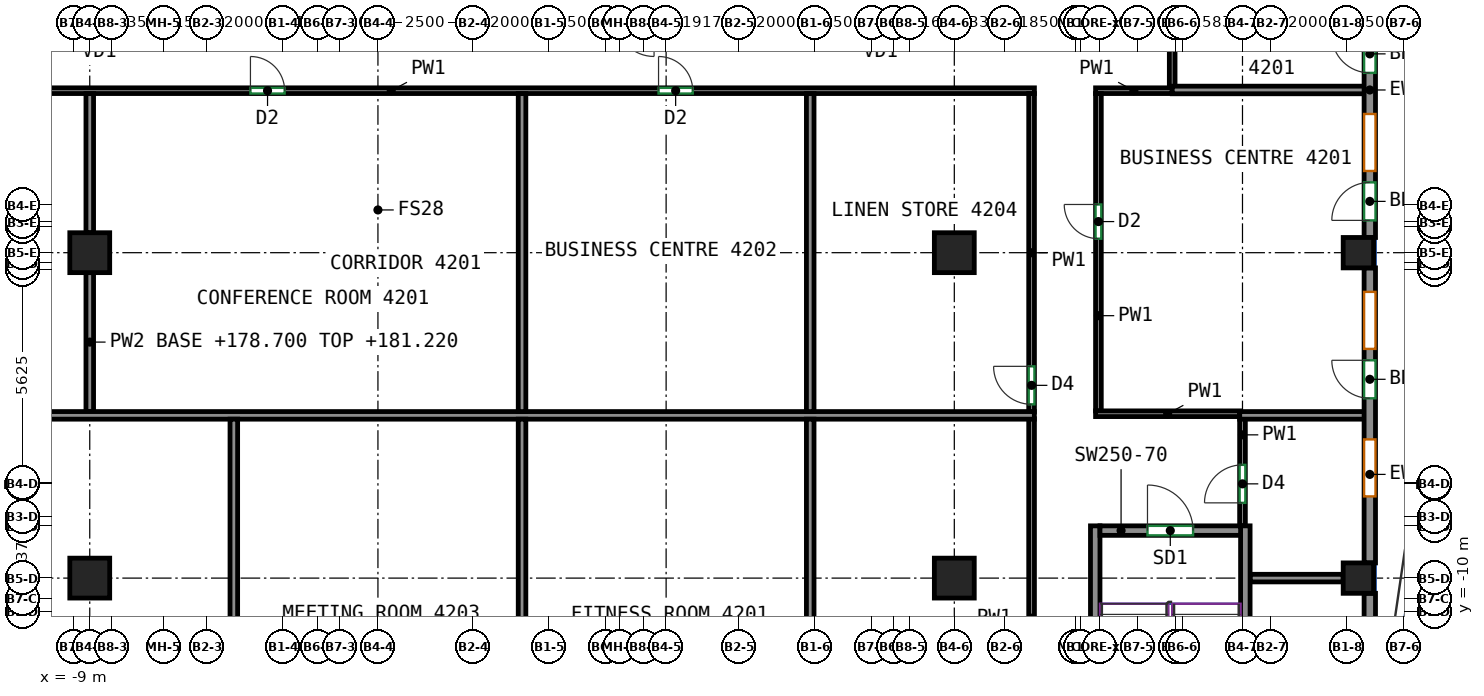
"""IFC4 building model, lengths in metres.
Left out: names, types, materials, properties, quantities, classifications, styles, units other than length and angle.
Written with IfcOpenShell. Run it as: python <this file> out.ifc"""

import sys

from ifc_helpers import new_model, si_unit, direction, frame, frame_2d, origin, origin_2d, place, context, subcontext, project, spatial, rectangle, extrude, source, transform, mapped, element, fill, save


model = new_model("IFC4")
c1 = context("Model", 3, precision=1e-05, world=origin(), true_north=direction((0.0, 1.0)))
c2 = subcontext(c1, "Body", "Model", "MODEL_VIEW")
j1 = project(units=[si_unit("LENGTHUNIT", "METRE"), si_unit("PLANEANGLEUNIT", "RADIAN")], contexts=[c1])
p1 = place(None, origin())
s1 = spatial("IfcSite", under=j1, at=p1, CompositionType="ELEMENT")
p2 = place(p1, origin())
s2 = spatial("IfcBuilding", under=s1, at=p2, CompositionType="ELEMENT")
p3 = place(p2, frame((0.0, 0.0, 178.7)))
s3 = spatial("IfcBuildingStorey", under=s2, at=p3, CompositionType="ELEMENT", Elevation=178.7)
m1 = source(origin(), c2, "Body", "SweptSolid", [
    extrude(rectangle(XDim=1.05, YDim=1.05, at=origin_2d()), origin(), (0.0, 0.0, 1.0), 3.12),
])
for number, where, z_axis, x_axis in (
    (1, (-8.583, -9.125, 0.0), (0.0, 0.0, 1.0), (1.0, 0.0, 0.0)),
    (2, (-8.583, -0.562, 0.0), (0.0, 0.0, 1.0), (1.0, 0.0, 0.0)),
    (3, (14.167, -9.125, 0.0), (0.0, 0.0, 1.0), (1.0, 0.0, 0.0)),
    (4, (14.167, -0.562, 0.0), (0.0, 0.0, 1.0), (1.0, 0.0, 0.0)),
):
    element("IfcColumn", number, at=place(p3, frame(where, z_axis=z_axis, x_axis=x_axis)), inside=s3, PredefinedType="COLUMN", context=c2, shape_type="MappedRepresentation", body=[
        mapped(m1, transform((0.0, 0.0, 0.0))),
    ])
m2 = source(origin(), c2, "Body", "SweptSolid", [
    extrude(rectangle(XDim=0.8, YDim=0.8, at=origin_2d()), origin(), (0.0, 0.0, 1.0), 3.12),
])
for number, where, z_axis, x_axis in (
    (5, (24.8, -9.125, 0.0), (0.0, 0.0, 1.0), (1.0, 0.0, 0.0)),
    (6, (24.8, -0.562, 0.0), (0.0, 0.0, 1.0), (1.0, 0.0, 0.0)),
):
    element("IfcColumn", number, at=place(p3, frame(where, z_axis=z_axis, x_axis=x_axis)), inside=s3, PredefinedType="COLUMN", context=c2, shape_type="MappedRepresentation", body=[
        mapped(m2, transform((0.0, 0.0, 0.0))),
    ])
m3 = source(origin(), c2, "Body", "SweptSolid", [
    extrude(rectangle(XDim=8.0, YDim=0.25, at=frame_2d((4.0, 0.0))), origin(), (0.0, 0.0, 1.0), 3.12),
])
for number, where, z_axis, x_axis in (
    (7, (17.875, -15.75, 0.0), (0.0, 0.0, 1.0), (0.0, 1.0, 0.0)),
    (8, (21.825, -15.75, 0.0), (0.0, 0.0, 1.0), (0.0, 1.0, 0.0)),
):
    element("IfcWall", number, at=place(p3, frame(where, z_axis=z_axis, x_axis=x_axis)), inside=s3, PredefinedType="SHEAR", context=c2, shape_type="MappedRepresentation", body=[
        mapped(m3, transform((0.0, 0.0, 0.0))),
    ])
m4 = source(origin(), c2, "Body", "SweptSolid", [
    extrude(rectangle(XDim=3.7, YDim=0.25, at=frame_2d((1.85, 0.0))), origin(), (0.0, 0.0, 1.0), 3.12),
])
p4 = place(p3, frame((18.0, -7.875, 0.0), z_axis=(0.0, 0.0, 1.0), x_axis=(1.0, 0.0, 0.0)))
e9 = element("IfcWall", 9, at=p4, inside=s3, PredefinedType="SHEAR", context=c2, shape_type="MappedRepresentation", body=[
    mapped(m4, transform((0.0, 0.0, 0.0))),
])
p5 = place(p4, frame((1.25, 0.0, 0.0)))
e10 = element("IfcOpeningElement", 10, at=p5, cuts=e9, PredefinedType="OPENING", context=c2, shape_type="SweptSolid", body=[
    extrude(rectangle(XDim=1.2, YDim=2.1, at=frame_2d((0.6, 1.05))), frame((0.0, 0.135, 0.0), z_axis=(0.0, -1.0, 0.0), x_axis=(1.0, 0.0, 0.0)), (0.0, 0.0, 1.0), 0.27),
])
m5 = source(origin(), c2, "Body", "SweptSolid", [
    extrude(rectangle(XDim=7.763, YDim=0.3, at=frame_2d((3.881, 0.0))), origin(), (0.0, 0.0, 1.0), 3.12),
])
p6 = place(p3, frame((25.1, -17.288, 0.0), z_axis=(0.0, 0.0, 1.0), x_axis=(0.0, 1.0, 0.0)))
e11 = element("IfcWall", 11, at=p6, inside=s3, PredefinedType="SOLIDWALL", context=c2, shape_type="MappedRepresentation", body=[
    mapped(m5, transform((0.0, 0.0, 0.0))),
])
p7 = place(p6, frame((1.75, 0.0, 0.85)))
e12 = element("IfcOpeningElement", 12, at=p7, cuts=e11, PredefinedType="OPENING", context=c2, shape_type="SweptSolid", body=[
    extrude(rectangle(XDim=1.5, YDim=1.95, at=frame_2d((0.75, 0.975))), frame((0.0, 0.16, 0.0), z_axis=(0.0, -1.0, 0.0), x_axis=(1.0, 0.0, 0.0)), (0.0, 0.0, 1.0), 0.32),
])
p8 = place(p6, frame((5.631, 0.0, 0.85)))
e13 = element("IfcOpeningElement", 13, at=p8, cuts=e11, PredefinedType="OPENING", context=c2, shape_type="SweptSolid", body=[
    extrude(rectangle(XDim=1.5, YDim=1.95, at=frame_2d((0.75, 0.975))), frame((0.0, 0.16, 0.0), z_axis=(0.0, -1.0, 0.0), x_axis=(1.0, 0.0, 0.0)), (0.0, 0.0, 1.0), 0.32),
])
p9 = place(p3, frame((25.1, -8.725, 0.0), z_axis=(0.0, 0.0, 1.0), x_axis=(0.0, 1.0, 0.0)))
e14 = element("IfcWall", 14, at=p9, inside=s3, PredefinedType="SOLIDWALL", context=c2, shape_type="MappedRepresentation", body=[
    mapped(m5, transform((0.0, 0.0, 0.0))),
])
p10 = place(p9, frame((1.75, 0.0, 0.85)))
e15 = element("IfcOpeningElement", 15, at=p10, cuts=e14, PredefinedType="OPENING", context=c2, shape_type="SweptSolid", body=[
    extrude(rectangle(XDim=1.5, YDim=1.95, at=frame_2d((0.75, 0.975))), frame((0.0, 0.16, 0.0), z_axis=(0.0, -1.0, 0.0), x_axis=(1.0, 0.0, 0.0)), (0.0, 0.0, 1.0), 0.32),
])
p11 = place(p9, frame((5.631, 0.0, 0.85)))
e16 = element("IfcOpeningElement", 16, at=p11, cuts=e14, PredefinedType="OPENING", context=c2, shape_type="SweptSolid", body=[
    extrude(rectangle(XDim=1.5, YDim=1.95, at=frame_2d((0.75, 0.975))), frame((0.0, 0.16, 0.0), z_axis=(0.0, -1.0, 0.0), x_axis=(1.0, 0.0, 0.0)), (0.0, 0.0, 1.0), 0.32),
])
p12 = place(p9, frame((4.331, 0.0, 0.0)))
e17 = element("IfcOpeningElement", 17, at=p12, cuts=e14, PredefinedType="OPENING", context=c2, shape_type="SweptSolid", body=[
    extrude(rectangle(XDim=1.0, YDim=2.1, at=frame_2d((0.5, 1.05))), frame((0.0, 0.16, 0.0), z_axis=(0.0, -1.0, 0.0), x_axis=(1.0, 0.0, 0.0)), (0.0, 0.0, 1.0), 0.32),
])
p13 = place(p3, frame((25.1, -0.163, 0.0), z_axis=(0.0, 0.0, 1.0), x_axis=(0.0, 1.0, 0.0)))
e18 = element("IfcWall", 18, at=p13, inside=s3, PredefinedType="SOLIDWALL", context=c2, shape_type="MappedRepresentation", body=[
    mapped(m5, transform((0.0, 0.0, 0.0))),
])
p14 = place(p13, frame((1.75, 0.0, 0.85)))
e19 = element("IfcOpeningElement", 19, at=p14, cuts=e18, PredefinedType="OPENING", context=c2, shape_type="SweptSolid", body=[
    extrude(rectangle(XDim=1.5, YDim=1.95, at=frame_2d((0.75, 0.975))), frame((0.0, 0.16, 0.0), z_axis=(0.0, -1.0, 0.0), x_axis=(1.0, 0.0, 0.0)), (0.0, 0.0, 1.0), 0.32),
])
p15 = place(p13, frame((0.45, 0.0, 0.0)))
e20 = element("IfcOpeningElement", 20, at=p15, cuts=e18, PredefinedType="OPENING", context=c2, shape_type="SweptSolid", body=[
    extrude(rectangle(XDim=1.0, YDim=2.1, at=frame_2d((0.5, 1.05))), frame((0.0, 0.16, 0.0), z_axis=(0.0, -1.0, 0.0), x_axis=(1.0, 0.0, 0.0)), (0.0, 0.0, 1.0), 0.32),
])
p16 = place(p13, frame((5.631, 0.0, 0.85)))
e21 = element("IfcOpeningElement", 21, at=p16, cuts=e18, PredefinedType="OPENING", context=c2, shape_type="SweptSolid", body=[
    extrude(rectangle(XDim=1.5, YDim=1.95, at=frame_2d((0.75, 0.975))), frame((0.0, 0.16, 0.0), z_axis=(0.0, -1.0, 0.0), x_axis=(1.0, 0.0, 0.0)), (0.0, 0.0, 1.0), 0.32),
])
p17 = place(p13, frame((4.331, 0.0, 0.0)))
e22 = element("IfcOpeningElement", 22, at=p17, cuts=e18, PredefinedType="OPENING", context=c2, shape_type="SweptSolid", body=[
    extrude(rectangle(XDim=1.0, YDim=2.1, at=frame_2d((0.5, 1.05))), frame((0.0, 0.16, 0.0), z_axis=(0.0, -1.0, 0.0), x_axis=(1.0, 0.0, 0.0)), (0.0, 0.0, 1.0), 0.32),
])
p18 = place(p3, frame((19.9, 3.809, 0.0), z_axis=(0.0, 0.0, 1.0), x_axis=(0.0, 1.0, 0.0)))
e23 = element("IfcWall", 23, at=p18, inside=s3, PredefinedType="PARTITIONING", context=c2, shape_type="SweptSolid", body=[
    extrude(rectangle(XDim=4.101, YDim=0.15, at=frame_2d((2.05, 0.0))), origin(), (0.0, 0.0, 1.0), 3.12),
])
p19 = place(p18, frame((1.4, 0.0, 0.0)))
e24 = element("IfcOpeningElement", 24, at=p19, cuts=e23, PredefinedType="OPENING", context=c2, shape_type="SweptSolid", body=[
    extrude(rectangle(XDim=0.9, YDim=2.1, at=frame_2d((0.45, 1.05))), frame((0.0, 0.085, 0.0), z_axis=(0.0, -1.0, 0.0), x_axis=(1.0, 0.0, 0.0)), (0.0, 0.0, 1.0), 0.17),
])
p20 = place(p3, frame((17.884, 3.7, 0.0), z_axis=(0.0, 0.0, 1.0), x_axis=(1.0, 0.0, 0.0)))
e25 = element("IfcWall", 25, at=p20, inside=s3, PredefinedType="PARTITIONING", context=c2, shape_type="SweptSolid", body=[
    extrude(rectangle(XDim=2.016, YDim=0.15, at=frame_2d((1.008, 0.0))), origin(), (0.0, 0.0, 1.0), 3.12),
])
p21 = place(p3, frame((17.959, -4.725, 0.0), z_axis=(0.0, 0.0, 1.0), x_axis=(0.0, 1.0, 0.0)))
e26 = element("IfcWall", 26, at=p21, inside=s3, PredefinedType="PARTITIONING", context=c2, shape_type="SweptSolid", body=[
    extrude(rectangle(XDim=8.35, YDim=0.15, at=frame_2d((4.175, 0.0))), origin(), (0.0, 0.0, 1.0), 3.12),
])
p22 = place(p21, frame((4.531, 0.0, 0.0)))
e27 = element("IfcOpeningElement", 27, at=p22, cuts=e26, PredefinedType="OPENING", context=c2, shape_type="SweptSolid", body=[
    extrude(rectangle(XDim=0.9, YDim=2.1, at=frame_2d((0.45, 1.05))), frame((0.0, 0.085, 0.0), z_axis=(0.0, -1.0, 0.0), x_axis=(1.0, 0.0, 0.0)), (0.0, 0.0, 1.0), 0.17),
])
p23 = place(p3, frame((17.884, -4.8, 0.0), z_axis=(0.0, 0.0, 1.0), x_axis=(1.0, 0.0, 0.0)))
e28 = element("IfcWall", 28, at=p23, inside=s3, PredefinedType="PARTITIONING", context=c2, shape_type="SweptSolid", body=[
    extrude(rectangle(XDim=3.793, YDim=0.15, at=frame_2d((1.896, 0.0))), origin(), (0.0, 0.0, 1.0), 3.12),
])
p24 = place(p3, frame((21.75, -7.75, 0.0), z_axis=(0.0, 0.0, 1.0), x_axis=(0.0, 1.0, 0.0)))
e29 = element("IfcWall", 29, at=p24, inside=s3, PredefinedType="PARTITIONING", context=c2, shape_type="SweptSolid", body=[
    extrude(rectangle(XDim=2.817, YDim=0.15, at=frame_2d((1.408, 0.0))), origin(), (0.0, 0.0, 1.0), 3.12),
])
p25 = place(p24, frame((0.605, 0.0, 0.0)))
e30 = element("IfcOpeningElement", 30, at=p25, cuts=e29, PredefinedType="OPENING", context=c2, shape_type="SweptSolid", body=[
    extrude(rectangle(XDim=1.0, YDim=2.1, at=frame_2d((0.5, 1.05))), frame((0.0, 0.085, 0.0), z_axis=(0.0, -1.0, 0.0), x_axis=(1.0, 0.0, 0.0)), (0.0, 0.0, 1.0), 0.17),
])
p26 = place(p3, frame((-17.575, 3.7, 0.0), z_axis=(0.0, 0.0, 1.0), x_axis=(1.0, 0.0, 0.0)))
e31 = element("IfcWall", 31, at=p26, inside=s3, PredefinedType="PARTITIONING", context=c2, shape_type="SweptSolid", body=[
    extrude(rectangle(XDim=33.85, YDim=0.15, at=frame_2d((16.925, 0.0))), origin(), (0.0, 0.0, 1.0), 3.12),
])
p27 = place(p26, frame((4.201, 0.0, 0.0)))
e32 = element("IfcOpeningElement", 32, at=p27, cuts=e31, PredefinedType="OPENING", context=c2, shape_type="SweptSolid", body=[
    extrude(rectangle(XDim=0.9, YDim=2.1, at=frame_2d((0.45, 1.05))), frame((0.0, 0.085, 0.0), z_axis=(0.0, -1.0, 0.0), x_axis=(1.0, 0.0, 0.0)), (0.0, 0.0, 1.0), 0.17),
])
p28 = place(p26, frame((13.22, 0.0, 0.0)))
e33 = element("IfcOpeningElement", 33, at=p28, cuts=e31, PredefinedType="OPENING", context=c2, shape_type="SweptSolid", body=[
    extrude(rectangle(XDim=0.9, YDim=2.1, at=frame_2d((0.45, 1.05))), frame((0.0, 0.085, 0.0), z_axis=(0.0, -1.0, 0.0), x_axis=(1.0, 0.0, 0.0)), (0.0, 0.0, 1.0), 0.17),
])
p29 = place(p26, frame((23.959, 0.0, 0.0)))
e34 = element("IfcOpeningElement", 34, at=p29, cuts=e31, PredefinedType="OPENING", context=c2, shape_type="SweptSolid", body=[
    extrude(rectangle(XDim=0.9, YDim=2.1, at=frame_2d((0.45, 1.05))), frame((0.0, 0.085, 0.0), z_axis=(0.0, -1.0, 0.0), x_axis=(1.0, 0.0, 0.0)), (0.0, 0.0, 1.0), 0.17),
])
p30 = place(p3, frame((16.2, -4.753, 0.0), z_axis=(0.0, 0.0, 1.0), x_axis=(0.0, 1.0, 0.0)))
e35 = element("IfcWall", 35, at=p30, inside=s3, PredefinedType="PARTITIONING", context=c2, shape_type="SweptSolid", body=[
    extrude(rectangle(XDim=8.378, YDim=0.15, at=frame_2d((4.189, 0.0))), origin(), (0.0, 0.0, 1.0), 3.12),
])
p31 = place(p30, frame((0.2, 0.0, 0.0)))
e36 = element("IfcOpeningElement", 36, at=p31, cuts=e35, PredefinedType="OPENING", context=c2, shape_type="SweptSolid", body=[
    extrude(rectangle(XDim=1.0, YDim=2.1, at=frame_2d((0.5, 1.05))), frame((0.0, 0.085, 0.0), z_axis=(0.0, -1.0, 0.0), x_axis=(1.0, 0.0, 0.0)), (0.0, 0.0, 1.0), 0.17),
])
p32 = place(p3, frame((16.2, -15.425, 0.0), z_axis=(0.0, 0.0, 1.0), x_axis=(0.0, 1.0, 0.0)))
e37 = element("IfcWall", 37, at=p32, inside=s3, PredefinedType="PARTITIONING", context=c2, shape_type="SweptSolid", body=[
    extrude(rectangle(XDim=10.492, YDim=0.15, at=frame_2d((5.246, 0.0))), origin(), (0.0, 0.0, 1.0), 3.12),
])
p33 = place(p32, frame((1.614, 0.0, 0.0)))
e38 = element("IfcOpeningElement", 38, at=p33, cuts=e37, PredefinedType="OPENING", context=c2, shape_type="SweptSolid", body=[
    extrude(rectangle(XDim=0.9, YDim=2.1, at=frame_2d((0.45, 1.05))), frame((0.0, 0.085, 0.0), z_axis=(0.0, -1.0, 0.0), x_axis=(1.0, 0.0, 0.0)), (0.0, 0.0, 1.0), 0.17),
])
p34 = place(p3, frame((19.902, 3.719, 0.0), z_axis=(0.0, 0.0, 1.0), x_axis=(1.0, 0.0, 0.0)))
e39 = element("IfcWall", 39, at=p34, inside=s3, PredefinedType="PARTITIONING", context=c2, shape_type="SweptSolid", body=[
    extrude(rectangle(XDim=5.098, YDim=0.2, at=frame_2d((2.549, 0.0))), origin(), (0.0, 0.0, 1.0), 3.12),
])
p35 = place(p3, frame((21.677, -4.843, 0.0), z_axis=(0.0, 0.0, 1.0), x_axis=(1.0, 0.0, 0.0)))
e40 = element("IfcWall", 40, at=p35, inside=s3, PredefinedType="PARTITIONING", context=c2, shape_type="SweptSolid", body=[
    extrude(rectangle(XDim=3.323, YDim=0.2, at=frame_2d((1.662, 0.0))), origin(), (0.0, 0.0, 1.0), 3.12),
])
p36 = place(p3, frame((21.95, -9.125, 0.0), z_axis=(0.0, 0.0, 1.0), x_axis=(1.0, 0.0, 0.0)))
e41 = element("IfcWall", 41, at=p36, inside=s3, PredefinedType="PARTITIONING", context=c2, shape_type="SweptSolid", body=[
    extrude(rectangle(XDim=2.45, YDim=0.2, at=frame_2d((1.225, 0.0))), origin(), (0.0, 0.0, 1.0), 3.12),
])
p37 = place(p3, frame((-8.583, -0.037, 0.0), z_axis=(0.0, 0.0, 1.0), x_axis=(0.0, 1.0, 0.0)))
e42 = element("IfcWall", 42, at=p37, inside=s3, PredefinedType="PARTITIONING", context=c2, shape_type="SweptSolid", body=[
    extrude(rectangle(XDim=3.66, YDim=0.2, at=frame_2d((1.83, 0.0))), origin(), (0.0, 0.0, 1.0), 3.12),
])
p38 = place(p3, frame((-8.583, -4.743, 0.0), z_axis=(0.0, 0.0, 1.0), x_axis=(0.0, 1.0, 0.0)))
e43 = element("IfcWall", 43, at=p38, inside=s3, PredefinedType="PARTITIONING", context=c2, shape_type="SweptSolid", body=[
    extrude(rectangle(XDim=3.656, YDim=0.2, at=frame_2d((1.828, 0.0))), origin(), (0.0, 0.0, 1.0), 2.52),
])
p39 = place(p3, frame((-13.873, -4.843, 0.0), z_axis=(0.0, 0.0, 1.0), x_axis=(1.0, 0.0, 0.0)))
e44 = element("IfcWall", 44, at=p39, inside=s3, PredefinedType="PARTITIONING", context=c2, shape_type="SweptSolid", body=[
    extrude(rectangle(XDim=30.146, YDim=0.2, at=frame_2d((15.073, 0.0))), origin(), (0.0, 0.0, 1.0), 3.12),
])
for number, where, z_axis, x_axis in (
    (45, (2.792, -4.743, 0.0), (0.0, 0.0, 1.0), (0.0, 1.0, 0.0)),
    (46, (10.375, -4.743, 0.0), (0.0, 0.0, 1.0), (0.0, 1.0, 0.0)),
):
    element("IfcWall", number, at=place(p3, frame(where, z_axis=z_axis, x_axis=x_axis)), inside=s3, PredefinedType="PARTITIONING", context=c2, shape_type="SweptSolid", body=[
        extrude(rectangle(XDim=8.366, YDim=0.2, at=frame_2d((4.183, 0.0))), origin(), (0.0, 0.0, 1.0), 3.12),
    ])
for number, where, z_axis, x_axis in (
    (47, (-4.792, -15.423, 0.0), (0.0, 0.0, 1.0), (0.0, 1.0, 0.0)),
    (48, (2.792, -15.423, 0.0), (0.0, 0.0, 1.0), (0.0, 1.0, 0.0)),
    (49, (10.375, -15.423, 0.0), (0.0, 0.0, 1.0), (0.0, 1.0, 0.0)),
):
    element("IfcWall", number, at=place(p3, frame(where, z_axis=z_axis, x_axis=x_axis)), inside=s3, PredefinedType="PARTITIONING", context=c2, shape_type="SweptSolid", body=[
        extrude(rectangle(XDim=10.48, YDim=0.2, at=frame_2d((5.24, 0.0))), origin(), (0.0, 0.0, 1.0), 3.12),
    ])
p40 = place(p10, origin())
e50 = element("IfcWindow", 50, at=p40, inside=s3, PartitioningType="SINGLE_PANEL", PredefinedType="WINDOW", context=c2, shape_type="SweptSolid", body=[
    extrude(rectangle(XDim=1.5, YDim=1.95, at=frame_2d((0.75, 0.975))), frame((0.0, 0.03, 0.0), z_axis=(0.0, -1.0, 0.0), x_axis=(1.0, 0.0, 0.0)), (0.0, 0.0, 1.0), 0.06),
])
fill(e15, e50)
p41 = place(p11, origin())
e51 = element("IfcWindow", 51, at=p41, inside=s3, PartitioningType="SINGLE_PANEL", PredefinedType="WINDOW", context=c2, shape_type="SweptSolid", body=[
    extrude(rectangle(XDim=1.5, YDim=1.95, at=frame_2d((0.75, 0.975))), frame((0.0, 0.03, 0.0), z_axis=(0.0, -1.0, 0.0), x_axis=(1.0, 0.0, 0.0)), (0.0, 0.0, 1.0), 0.06),
])
fill(e16, e51)
p42 = place(p12, origin())
e52 = element("IfcDoor", 52, at=p42, inside=s3, OperationType="SINGLE_SWING_RIGHT", PredefinedType="DOOR", context=c2, shape_type="SweptSolid", body=[
    extrude(rectangle(XDim=1.0, YDim=2.1, at=frame_2d((0.5, 1.05))), frame((0.0, 0.025, 0.0), z_axis=(0.0, -1.0, 0.0), x_axis=(1.0, 0.0, 0.0)), (0.0, 0.0, 1.0), 0.05),
])
fill(e17, e52)
p43 = place(p14, origin())
e53 = element("IfcWindow", 53, at=p43, inside=s3, PartitioningType="SINGLE_PANEL", PredefinedType="WINDOW", context=c2, shape_type="SweptSolid", body=[
    extrude(rectangle(XDim=1.5, YDim=1.95, at=frame_2d((0.75, 0.975))), frame((0.0, 0.03, 0.0), z_axis=(0.0, -1.0, 0.0), x_axis=(1.0, 0.0, 0.0)), (0.0, 0.0, 1.0), 0.06),
])
fill(e19, e53)
p44 = place(p15, origin())
e54 = element("IfcDoor", 54, at=p44, inside=s3, OperationType="SINGLE_SWING_LEFT", PredefinedType="DOOR", context=c2, shape_type="SweptSolid", body=[
    extrude(rectangle(XDim=1.0, YDim=2.1, at=frame_2d((0.5, 1.05))), frame((0.0, 0.025, 0.0), z_axis=(0.0, -1.0, 0.0), x_axis=(1.0, 0.0, 0.0)), (0.0, 0.0, 1.0), 0.05),
])
fill(e20, e54)
p45 = place(p17, origin())
e55 = element("IfcDoor", 55, at=p45, inside=s3, OperationType="SINGLE_SWING_RIGHT", PredefinedType="DOOR", context=c2, shape_type="SweptSolid", body=[
    extrude(rectangle(XDim=1.0, YDim=2.1, at=frame_2d((0.5, 1.05))), frame((0.0, 0.025, 0.0), z_axis=(0.0, -1.0, 0.0), x_axis=(1.0, 0.0, 0.0)), (0.0, 0.0, 1.0), 0.05),
])
fill(e22, e55)
p46 = place(p5, origin())
e56 = element("IfcDoor", 56, at=p46, inside=s3, OperationType="DOUBLE_DOOR_SINGLE_SWING", PredefinedType="DOOR", context=c2, shape_type="SweptSolid", body=[
    extrude(rectangle(XDim=1.2, YDim=2.1, at=frame_2d((0.6, 1.05))), frame((0.0, 0.025, 0.0), z_axis=(0.0, -1.0, 0.0), x_axis=(1.0, 0.0, 0.0)), (0.0, 0.0, 1.0), 0.05),
])
fill(e10, e56)
p47 = place(p25, origin())
e57 = element("IfcDoor", 57, at=p47, inside=s3, OperationType="SINGLE_SWING_LEFT", PredefinedType="DOOR", context=c2, shape_type="SweptSolid", body=[
    extrude(rectangle(XDim=1.0, YDim=2.1, at=frame_2d((0.5, 1.05))), frame((0.0, 0.025, 0.0), z_axis=(0.0, -1.0, 0.0), x_axis=(1.0, 0.0, 0.0)), (0.0, 0.0, 1.0), 0.05),
])
fill(e30, e57)
p48 = place(p31, origin())
e58 = element("IfcDoor", 58, at=p48, inside=s3, OperationType="SINGLE_SWING_RIGHT", PredefinedType="DOOR", context=c2, shape_type="SweptSolid", body=[
    extrude(rectangle(XDim=1.0, YDim=2.1, at=frame_2d((0.5, 1.05))), frame((0.0, 0.025, 0.0), z_axis=(0.0, -1.0, 0.0), x_axis=(1.0, 0.0, 0.0)), (0.0, 0.0, 1.0), 0.05),
])
fill(e36, e58)
p49 = place(p22, origin())
e59 = element("IfcDoor", 59, at=p49, inside=s3, OperationType="SINGLE_SWING_RIGHT", PredefinedType="DOOR", context=c2, shape_type="SweptSolid", body=[
    extrude(rectangle(XDim=0.9, YDim=2.1, at=frame_2d((0.45, 1.05))), frame((0.0, 0.025, 0.0), z_axis=(0.0, -1.0, 0.0), x_axis=(1.0, 0.0, 0.0)), (0.0, 0.0, 1.0), 0.05),
])
fill(e27, e59)
p50 = place(p28, origin())
e60 = element("IfcDoor", 60, at=p50, inside=s3, OperationType="SINGLE_SWING_LEFT", PredefinedType="DOOR", context=c2, shape_type="SweptSolid", body=[
    extrude(rectangle(XDim=0.9, YDim=2.1, at=frame_2d((0.45, 1.05))), frame((0.0, 0.025, 0.0), z_axis=(0.0, -1.0, 0.0), x_axis=(1.0, 0.0, 0.0)), (0.0, 0.0, 1.0), 0.05),
])
fill(e33, e60)
p51 = place(p29, origin())
e61 = element("IfcDoor", 61, at=p51, inside=s3, OperationType="SINGLE_SWING_LEFT", PredefinedType="DOOR", context=c2, shape_type="SweptSolid", body=[
    extrude(rectangle(XDim=0.9, YDim=2.1, at=frame_2d((0.45, 1.05))), frame((0.0, 0.025, 0.0), z_axis=(0.0, -1.0, 0.0), x_axis=(1.0, 0.0, 0.0)), (0.0, 0.0, 1.0), 0.05),
])
fill(e34, e61)
save(model, sys.argv[1])
